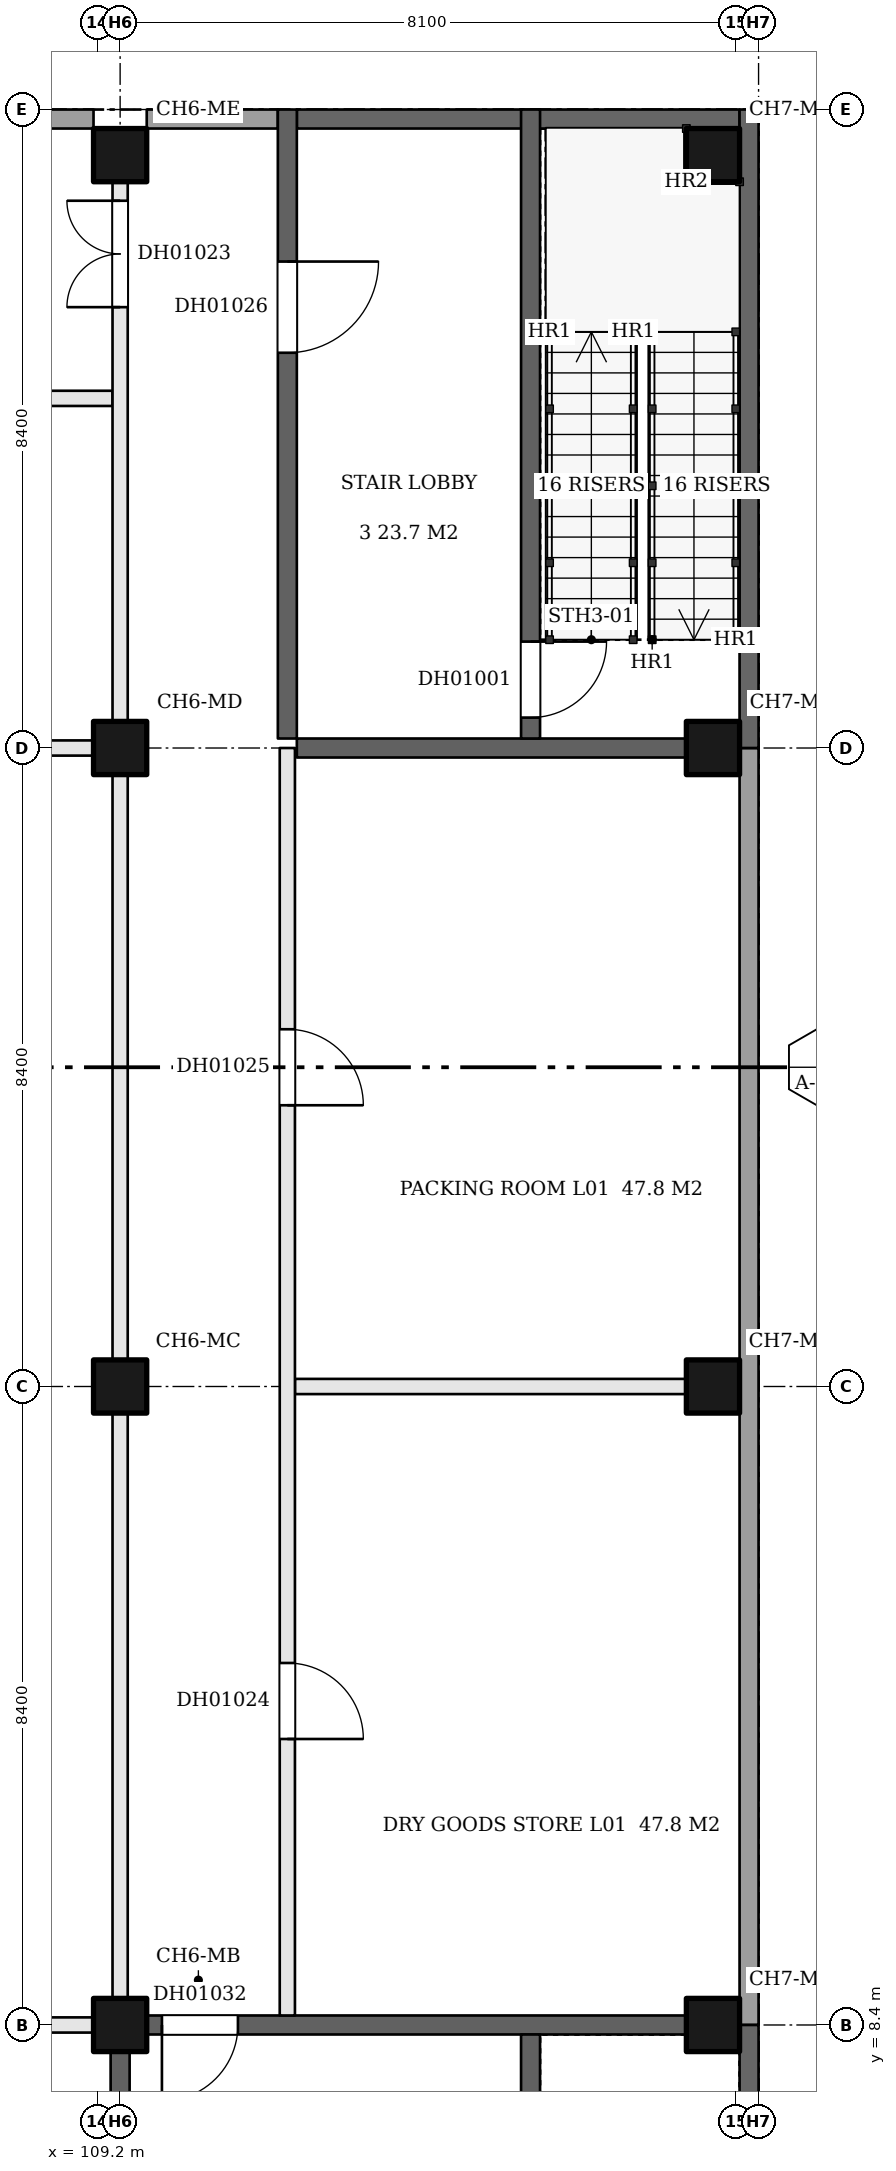
"""IFC4 building model, lengths in metres.
Left out: names, types, materials, properties, quantities, classifications, styles, units other than length and angle.
Written with IfcOpenShell. Run it as: python <this file> out.ifc"""

import sys

from ifc_helpers import new_model, si_unit, direction, frame, frame_2d, origin, origin_2d, place, context, subcontext, project, spatial, rectangle, extrude, element, fill, save


model = new_model("IFC4")
c1 = context("Model", 3, precision=1e-05, world=origin(), true_north=direction((0.0, 1.0)))
c2 = subcontext(c1, "Body", "Model", "MODEL_VIEW")
j1 = project(units=[si_unit("LENGTHUNIT", "METRE"), si_unit("PLANEANGLEUNIT", "RADIAN")], contexts=[c1])
p1 = place(None, origin())
s1 = spatial("IfcSite", under=j1, at=p1, CompositionType="ELEMENT")
p2 = place(p1, origin())
s2 = spatial("IfcBuilding", under=s1, at=p2, CompositionType="ELEMENT")
p3 = place(p2, frame((0.0, 0.0, 9.0)))
s3 = spatial("IfcBuildingStorey", under=s2, at=p3, CompositionType="ELEMENT", Elevation=9.0)
for number, where, z_axis, x_axis in (
    (1, (109.5, 8.4, 0.0), (0.0, 0.0, 1.0), (1.0, 0.0, 0.0)),
    (2, (109.5, 16.8, 0.0), (0.0, 0.0, 1.0), (1.0, 0.0, 0.0)),
    (3, (109.5, 25.2, 0.0), (0.0, 0.0, 1.0), (1.0, 0.0, 0.0)),
    (4, (109.5, 33.0, 0.0), (0.0, 0.0, 1.0), (1.0, 0.0, 0.0)),
    (5, (117.3, 8.4, 0.0), (0.0, 0.0, 1.0), (1.0, 0.0, 0.0)),
    (6, (117.3, 16.8, 0.0), (0.0, 0.0, 1.0), (1.0, 0.0, 0.0)),
    (7, (117.3, 25.2, 0.0), (0.0, 0.0, 1.0), (1.0, 0.0, 0.0)),
    (8, (117.3, 33.0, 0.0), (0.0, 0.0, 1.0), (1.0, 0.0, 0.0)),
):
    element("IfcColumn", number, at=place(p3, frame(where, z_axis=z_axis, x_axis=x_axis)), inside=s3, PredefinedType="COLUMN", context=c2, shape_type="SweptSolid", body=[
        extrude(rectangle(XDim=0.7, YDim=0.7, at=origin_2d()), origin(), (0.0, 0.0, 1.0), 5.1),
    ])
p4 = place(p3, frame((101.45, 8.4, 0.0), z_axis=(0.0, 0.0, 1.0), x_axis=(1.0, 0.0, 0.0)))
e9 = element("IfcWall", 9, at=p4, inside=s3, PredefinedType="PARTITIONING", context=c2, shape_type="SweptSolid", body=[
    extrude(rectangle(XDim=7.7, YDim=0.2, at=frame_2d((3.85, 0.0))), origin(), (0.0, 0.0, 1.0), 5.1),
])
p5 = place(p4, frame((2.15, 0.0, 0.0)))
e10 = element("IfcOpeningElement", 10, at=p5, cuts=e9, PredefinedType="OPENING", context=c2, shape_type="SweptSolid", body=[
    extrude(rectangle(XDim=1.0, YDim=2.1, at=frame_2d((0.5, 1.05))), frame((0.0, 0.11, 0.0), z_axis=(0.0, -1.0, 0.0), x_axis=(1.0, 0.0, 0.0)), (0.0, 0.0, 1.0), 0.22),
])
p6 = place(p4, frame((5.15, 0.0, 0.0)))
e11 = element("IfcOpeningElement", 11, at=p6, cuts=e9, PredefinedType="OPENING", context=c2, shape_type="SweptSolid", body=[
    extrude(rectangle(XDim=1.0, YDim=2.1, at=frame_2d((0.5, 1.05))), frame((0.0, 0.11, 0.0), z_axis=(0.0, -1.0, 0.0), x_axis=(1.0, 0.0, 0.0)), (0.0, 0.0, 1.0), 0.22),
])
p7 = place(p3, frame((109.85, 8.4, 0.0), z_axis=(0.0, 0.0, 1.0), x_axis=(1.0, 0.0, 0.0)))
e12 = element("IfcWall", 12, at=p7, inside=s3, PredefinedType="SHEAR", context=c2, shape_type="SweptSolid", body=[
    extrude(rectangle(XDim=7.1, YDim=0.25, at=frame_2d((3.55, 0.0))), origin(), (0.0, 0.0, 1.0), 5.1),
])
p8 = place(p7, frame((0.2, 0.0, 0.0)))
e13 = element("IfcOpeningElement", 13, at=p8, cuts=e12, PredefinedType="OPENING", context=c2, shape_type="SweptSolid", body=[
    extrude(rectangle(XDim=1.0, YDim=2.1, at=frame_2d((0.5, 1.05))), frame((0.0, 0.135, 0.0), z_axis=(0.0, -1.0, 0.0), x_axis=(1.0, 0.0, 0.0)), (0.0, 0.0, 1.0), 0.27),
])
p9 = place(p3, frame((111.8, 16.8, 0.0), z_axis=(0.0, 0.0, 1.0), x_axis=(1.0, 0.0, 0.0)))
e14 = element("IfcWall", 14, at=p9, inside=s3, PredefinedType="PARTITIONING", context=c2, shape_type="SweptSolid", body=[
    extrude(rectangle(XDim=5.15, YDim=0.2, at=frame_2d((2.575, 0.0))), origin(), (0.0, 0.0, 1.0), 5.1),
])
p10 = place(p3, frame((101.45, 25.2, 0.0), z_axis=(0.0, 0.0, 1.0), x_axis=(1.0, 0.0, 0.0)))
e15 = element("IfcWall", 15, at=p10, inside=s3, PredefinedType="PARTITIONING", context=c2, shape_type="SweptSolid", body=[
    extrude(rectangle(XDim=7.7, YDim=0.2, at=frame_2d((3.85, 0.0))), origin(), (0.0, 0.0, 1.0), 5.1),
])
p11 = place(p3, frame((111.825, 25.2, 0.0), z_axis=(0.0, 0.0, 1.0), x_axis=(1.0, 0.0, 0.0)))
e16 = element("IfcWall", 16, at=p11, inside=s3, PredefinedType="SHEAR", context=c2, shape_type="SweptSolid", body=[
    extrude(rectangle(XDim=5.125, YDim=0.25, at=frame_2d((2.562, 0.0))), origin(), (0.0, 0.0, 1.0), 5.1),
])
p12 = place(p3, frame((76.025, 29.8, 0.0), z_axis=(0.0, 0.0, 1.0), x_axis=(1.0, 0.0, 0.0)))
e17 = element("IfcWall", 17, at=p12, inside=s3, PredefinedType="PARTITIONING", context=c2, shape_type="SweptSolid", body=[
    extrude(rectangle(XDim=33.375, YDim=0.2, at=frame_2d((16.688, 0.0))), origin(), (0.0, 0.0, 1.0), 5.1),
])
p13 = place(p12, frame((1.538, 0.0, 0.0)))
e18 = element("IfcOpeningElement", 18, at=p13, cuts=e17, PredefinedType="OPENING", context=c2, shape_type="SweptSolid", body=[
    extrude(rectangle(XDim=1.0, YDim=2.1, at=frame_2d((0.5, 1.05))), frame((0.0, 0.11, 0.0), z_axis=(0.0, -1.0, 0.0), x_axis=(1.0, 0.0, 0.0)), (0.0, 0.0, 1.0), 0.22),
])
p14 = place(p12, frame((5.675, 0.0, 0.0)))
e19 = element("IfcOpeningElement", 19, at=p14, cuts=e17, PredefinedType="OPENING", context=c2, shape_type="SweptSolid", body=[
    extrude(rectangle(XDim=1.0, YDim=2.1, at=frame_2d((0.5, 1.05))), frame((0.0, 0.11, 0.0), z_axis=(0.0, -1.0, 0.0), x_axis=(1.0, 0.0, 0.0)), (0.0, 0.0, 1.0), 0.22),
])
p15 = place(p12, frame((9.175, 0.0, 0.0)))
e20 = element("IfcOpeningElement", 20, at=p15, cuts=e17, PredefinedType="OPENING", context=c2, shape_type="SweptSolid", body=[
    extrude(rectangle(XDim=1.0, YDim=2.1, at=frame_2d((0.5, 1.05))), frame((0.0, 0.11, 0.0), z_axis=(0.0, -1.0, 0.0), x_axis=(1.0, 0.0, 0.0)), (0.0, 0.0, 1.0), 0.22),
])
p16 = place(p12, frame((14.775, 0.0, 0.0)))
e21 = element("IfcOpeningElement", 21, at=p16, cuts=e17, PredefinedType="OPENING", context=c2, shape_type="SweptSolid", body=[
    extrude(rectangle(XDim=1.0, YDim=2.1, at=frame_2d((0.5, 1.05))), frame((0.0, 0.11, 0.0), z_axis=(0.0, -1.0, 0.0), x_axis=(1.0, 0.0, 0.0)), (0.0, 0.0, 1.0), 0.22),
])
p17 = place(p12, frame((22.475, 0.0, 0.0)))
e22 = element("IfcOpeningElement", 22, at=p17, cuts=e17, PredefinedType="OPENING", context=c2, shape_type="SweptSolid", body=[
    extrude(rectangle(XDim=1.0, YDim=2.1, at=frame_2d((0.5, 1.05))), frame((0.0, 0.11, 0.0), z_axis=(0.0, -1.0, 0.0), x_axis=(1.0, 0.0, 0.0)), (0.0, 0.0, 1.0), 0.22),
])
p18 = place(p12, frame((29.475, 0.0, 0.0)))
e23 = element("IfcOpeningElement", 23, at=p18, cuts=e17, PredefinedType="OPENING", context=c2, shape_type="SweptSolid", body=[
    extrude(rectangle(XDim=1.0, YDim=2.1, at=frame_2d((0.5, 1.05))), frame((0.0, 0.11, 0.0), z_axis=(0.0, -1.0, 0.0), x_axis=(1.0, 0.0, 0.0)), (0.0, 0.0, 1.0), 0.22),
])
p19 = place(p3, frame((101.45, 33.475, 0.0), z_axis=(0.0, 0.0, 1.0), x_axis=(1.0, 0.0, 0.0)))
e24 = element("IfcWall", 24, at=p19, inside=s3, PredefinedType="SOLIDWALL", context=c2, shape_type="SweptSolid", body=[
    extrude(rectangle(XDim=7.7, YDim=0.25, at=frame_2d((3.85, 0.0))), origin(), (0.0, 0.0, 1.0), 5.1),
])
p20 = place(p19, frame((0.725, 0.0, 0.9)))
e25 = element("IfcOpeningElement", 25, at=p20, cuts=e24, PredefinedType="OPENING", context=c2, shape_type="SweptSolid", body=[
    extrude(rectangle(XDim=2.4, YDim=1.5, at=frame_2d((1.2, 0.75))), frame((0.0, 0.135, 0.0), z_axis=(0.0, -1.0, 0.0), x_axis=(1.0, 0.0, 0.0)), (0.0, 0.0, 1.0), 0.27),
])
p21 = place(p19, frame((4.575, 0.0, 0.9)))
e26 = element("IfcOpeningElement", 26, at=p21, cuts=e24, PredefinedType="OPENING", context=c2, shape_type="SweptSolid", body=[
    extrude(rectangle(XDim=2.4, YDim=1.5, at=frame_2d((1.2, 0.75))), frame((0.0, 0.135, 0.0), z_axis=(0.0, -1.0, 0.0), x_axis=(1.0, 0.0, 0.0)), (0.0, 0.0, 1.0), 0.27),
])
p22 = place(p3, frame((109.85, 33.475, 0.0), z_axis=(0.0, 0.0, 1.0), x_axis=(1.0, 0.0, 0.0)))
e27 = element("IfcWall", 27, at=p22, inside=s3, PredefinedType="SOLIDWALL", context=c2, shape_type="SweptSolid", body=[
    extrude(rectangle(XDim=1.725, YDim=0.25, at=frame_2d((0.862, 0.0))), origin(), (0.0, 0.0, 1.0), 5.1),
])
p23 = place(p3, frame((111.825, 33.475, 0.0), z_axis=(0.0, 0.0, 1.0), x_axis=(1.0, 0.0, 0.0)))
e28 = element("IfcWall", 28, at=p23, inside=s3, PredefinedType="SHEAR", context=c2, shape_type="SweptSolid", body=[
    extrude(rectangle(XDim=5.825, YDim=0.25, at=frame_2d((2.913, 0.0))), origin(), (0.0, 0.0, 1.0), 5.1),
])
p24 = place(p3, frame((109.5, 0.95, 0.0), z_axis=(0.0, 0.0, 1.0), x_axis=(0.0, 1.0, 0.0)))
e29 = element("IfcWall", 29, at=p24, inside=s3, PredefinedType="SHEAR", context=c2, shape_type="SweptSolid", body=[
    extrude(rectangle(XDim=7.1, YDim=0.25, at=frame_2d((3.55, 0.0))), origin(), (0.0, 0.0, 1.0), 5.1),
])
p25 = place(p24, frame((4.25, 0.0, 0.0)))
e30 = element("IfcOpeningElement", 30, at=p25, cuts=e29, PredefinedType="OPENING", context=c2, shape_type="SweptSolid", body=[
    extrude(rectangle(XDim=1.4, YDim=2.1, at=frame_2d((0.7, 1.05))), frame((0.0, 0.135, 0.0), z_axis=(0.0, -1.0, 0.0), x_axis=(1.0, 0.0, 0.0)), (0.0, 0.0, 1.0), 0.27),
])
p26 = place(p3, frame((109.5, 8.75, 0.0), z_axis=(0.0, 0.0, 1.0), x_axis=(0.0, 1.0, 0.0)))
e31 = element("IfcWall", 31, at=p26, inside=s3, PredefinedType="PARTITIONING", context=c2, shape_type="SweptSolid", body=[
    extrude(rectangle(XDim=7.7, YDim=0.2, at=frame_2d((3.85, 0.0))), origin(), (0.0, 0.0, 1.0), 5.1),
])
p27 = place(p3, frame((109.5, 17.15, 0.0), z_axis=(0.0, 0.0, 1.0), x_axis=(0.0, 1.0, 0.0)))
e32 = element("IfcWall", 32, at=p27, inside=s3, PredefinedType="PARTITIONING", context=c2, shape_type="SweptSolid", body=[
    extrude(rectangle(XDim=7.7, YDim=0.2, at=frame_2d((3.85, 0.0))), origin(), (0.0, 0.0, 1.0), 5.1),
])
p28 = place(p3, frame((109.5, 25.55, 0.0), z_axis=(0.0, 0.0, 1.0), x_axis=(0.0, 1.0, 0.0)))
e33 = element("IfcWall", 33, at=p28, inside=s3, PredefinedType="PARTITIONING", context=c2, shape_type="SweptSolid", body=[
    extrude(rectangle(XDim=7.1, YDim=0.2, at=frame_2d((3.55, 0.0))), origin(), (0.0, 0.0, 1.0), 5.1),
])
p29 = place(p28, frame((5.45, 0.0, 0.0)))
e34 = element("IfcOpeningElement", 34, at=p29, cuts=e33, PredefinedType="OPENING", context=c2, shape_type="SweptSolid", body=[
    extrude(rectangle(XDim=1.4, YDim=2.1, at=frame_2d((0.7, 1.05))), frame((0.0, 0.11, 0.0), z_axis=(0.0, -1.0, 0.0), x_axis=(1.0, 0.0, 0.0)), (0.0, 0.0, 1.0), 0.22),
])
p30 = place(p3, frame((111.7, 8.525, 0.0), z_axis=(0.0, 0.0, 1.0), x_axis=(0.0, 1.0, 0.0)))
e35 = element("IfcWall", 35, at=p30, inside=s3, PredefinedType="PARTITIONING", context=c2, shape_type="SweptSolid", body=[
    extrude(rectangle(XDim=16.675, YDim=0.2, at=frame_2d((8.337, 0.0))), origin(), (0.0, 0.0, 1.0), 5.1),
])
p31 = place(p30, frame((3.637, 0.0, 0.0)))
e36 = element("IfcOpeningElement", 36, at=p31, cuts=e35, PredefinedType="OPENING", context=c2, shape_type="SweptSolid", body=[
    extrude(rectangle(XDim=1.0, YDim=2.1, at=frame_2d((0.5, 1.05))), frame((0.0, 0.11, 0.0), z_axis=(0.0, -1.0, 0.0), x_axis=(1.0, 0.0, 0.0)), (0.0, 0.0, 1.0), 0.22),
])
p32 = place(p30, frame((11.975, 0.0, 0.0)))
e37 = element("IfcOpeningElement", 37, at=p32, cuts=e35, PredefinedType="OPENING", context=c2, shape_type="SweptSolid", body=[
    extrude(rectangle(XDim=1.0, YDim=2.1, at=frame_2d((0.5, 1.05))), frame((0.0, 0.11, 0.0), z_axis=(0.0, -1.0, 0.0), x_axis=(1.0, 0.0, 0.0)), (0.0, 0.0, 1.0), 0.22),
])
p33 = place(p3, frame((111.7, 25.325, 0.0), z_axis=(0.0, 0.0, 1.0), x_axis=(0.0, 1.0, 0.0)))
e38 = element("IfcWall", 38, at=p33, inside=s3, PredefinedType="SHEAR", context=c2, shape_type="SweptSolid", body=[
    extrude(rectangle(XDim=8.275, YDim=0.25, at=frame_2d((4.138, 0.0))), origin(), (0.0, 0.0, 1.0), 5.1),
])
p34 = place(p33, frame((5.075, 0.0, 0.0)))
e39 = element("IfcOpeningElement", 39, at=p34, cuts=e38, PredefinedType="OPENING", context=c2, shape_type="SweptSolid", body=[
    extrude(rectangle(XDim=1.2, YDim=2.1, at=frame_2d((0.6, 1.05))), frame((0.0, 0.135, 0.0), z_axis=(0.0, -1.0, 0.0), x_axis=(1.0, 0.0, 0.0)), (0.0, 0.0, 1.0), 0.27),
])
p35 = place(p3, frame((114.9, 3.125, 0.0), z_axis=(0.0, 0.0, 1.0), x_axis=(0.0, 1.0, 0.0)))
e40 = element("IfcWall", 40, at=p35, inside=s3, PredefinedType="SHEAR", context=c2, shape_type="SweptSolid", body=[
    extrude(rectangle(XDim=5.15, YDim=0.25, at=frame_2d((2.575, 0.0))), origin(), (0.0, 0.0, 1.0), 5.1),
])
p36 = place(p35, frame((3.075, 0.0, 0.0)))
e41 = element("IfcOpeningElement", 41, at=p36, cuts=e40, PredefinedType="OPENING", context=c2, shape_type="SweptSolid", body=[
    extrude(rectangle(XDim=1.1, YDim=2.1, at=frame_2d((0.55, 1.05))), frame((0.0, 0.135, 0.0), z_axis=(0.0, -1.0, 0.0), x_axis=(1.0, 0.0, 0.0)), (0.0, 0.0, 1.0), 0.27),
])
p37 = place(p35, frame((0.475, 0.0, 0.0)))
e42 = element("IfcOpeningElement", 42, at=p37, cuts=e40, PredefinedType="OPENING", context=c2, shape_type="SweptSolid", body=[
    extrude(rectangle(XDim=0.9, YDim=2.1, at=frame_2d((0.45, 1.05))), frame((0.0, 0.135, 0.0), z_axis=(0.0, -1.0, 0.0), x_axis=(1.0, 0.0, 0.0)), (0.0, 0.0, 1.0), 0.27),
])
p38 = place(p3, frame((114.9, 25.325, 0.0), z_axis=(0.0, 0.0, 1.0), x_axis=(0.0, 1.0, 0.0)))
e43 = element("IfcWall", 43, at=p38, inside=s3, PredefinedType="SHEAR", context=c2, shape_type="SweptSolid", body=[
    extrude(rectangle(XDim=8.275, YDim=0.25, at=frame_2d((4.138, 0.0))), origin(), (0.0, 0.0, 1.0), 5.1),
])
p39 = place(p38, frame((0.275, 0.0, 0.0)))
e44 = element("IfcOpeningElement", 44, at=p39, cuts=e43, PredefinedType="OPENING", context=c2, shape_type="SweptSolid", body=[
    extrude(rectangle(XDim=1.0, YDim=2.1, at=frame_2d((0.5, 1.05))), frame((0.0, 0.135, 0.0), z_axis=(0.0, -1.0, 0.0), x_axis=(1.0, 0.0, 0.0)), (0.0, 0.0, 1.0), 0.27),
])
p40 = place(p3, frame((117.775, 0.0, 0.0), z_axis=(0.0, 0.0, 1.0), x_axis=(0.0, 1.0, 0.0)))
e45 = element("IfcWall", 45, at=p40, inside=s3, PredefinedType="SHEAR", context=c2, shape_type="SweptSolid", body=[
    extrude(rectangle(XDim=8.4, YDim=0.25, at=frame_2d((4.2, 0.0))), origin(), (0.0, 0.0, 1.0), 5.1),
])
p41 = place(p3, frame((117.775, 8.4, 0.0), z_axis=(0.0, 0.0, 1.0), x_axis=(0.0, 1.0, 0.0)))
e46 = element("IfcWall", 46, at=p41, inside=s3, PredefinedType="SOLIDWALL", context=c2, shape_type="SweptSolid", body=[
    extrude(rectangle(XDim=16.8, YDim=0.25, at=frame_2d((8.4, 0.0))), origin(), (0.0, 0.0, 1.0), 5.1),
])
p42 = place(p3, frame((117.775, 25.2, 0.0), z_axis=(0.0, 0.0, 1.0), x_axis=(0.0, 1.0, 0.0)))
e47 = element("IfcWall", 47, at=p42, inside=s3, PredefinedType="SHEAR", context=c2, shape_type="SweptSolid", body=[
    extrude(rectangle(XDim=8.4, YDim=0.25, at=frame_2d((4.2, 0.0))), origin(), (0.0, 0.0, 1.0), 5.1),
])
p43 = place(p39, frame((1.0, 0.0, 0.0), z_axis=(0.0, 0.0, 1.0), x_axis=(-1.0, 0.0, 0.0)))
e48 = element("IfcDoor", 48, at=p43, inside=s3, OperationType="SINGLE_SWING_LEFT", PredefinedType="DOOR", context=c2, shape_type="SweptSolid", body=[
    extrude(rectangle(XDim=1.0, YDim=2.1, at=frame_2d((0.5, 1.05))), frame((0.0, 0.025, 0.0), z_axis=(0.0, -1.0, 0.0), x_axis=(1.0, 0.0, 0.0)), (0.0, 0.0, 1.0), 0.05),
])
fill(e44, e48)
p44 = place(p29, origin())
e49 = element("IfcDoor", 49, at=p44, inside=s3, OperationType="DOUBLE_DOOR_SINGLE_SWING", PredefinedType="DOOR", context=c2, shape_type="SweptSolid", body=[
    extrude(rectangle(XDim=1.4, YDim=2.1, at=frame_2d((0.7, 1.05))), frame((0.0, 0.025, 0.0), z_axis=(0.0, -1.0, 0.0), x_axis=(1.0, 0.0, 0.0)), (0.0, 0.0, 1.0), 0.05),
])
fill(e34, e49)
p45 = place(p31, frame((1.0, 0.0, 0.0), z_axis=(0.0, 0.0, 1.0), x_axis=(-1.0, 0.0, 0.0)))
e50 = element("IfcDoor", 50, at=p45, inside=s3, OperationType="SINGLE_SWING_RIGHT", PredefinedType="DOOR", context=c2, shape_type="SweptSolid", body=[
    extrude(rectangle(XDim=1.0, YDim=2.1, at=frame_2d((0.5, 1.05))), frame((0.0, 0.025, 0.0), z_axis=(0.0, -1.0, 0.0), x_axis=(1.0, 0.0, 0.0)), (0.0, 0.0, 1.0), 0.05),
])
fill(e36, e50)
p46 = place(p32, frame((1.0, 0.0, 0.0), z_axis=(0.0, 0.0, 1.0), x_axis=(-1.0, 0.0, 0.0)))
e51 = element("IfcDoor", 51, at=p46, inside=s3, OperationType="SINGLE_SWING_RIGHT", PredefinedType="DOOR", context=c2, shape_type="SweptSolid", body=[
    extrude(rectangle(XDim=1.0, YDim=2.1, at=frame_2d((0.5, 1.05))), frame((0.0, 0.025, 0.0), z_axis=(0.0, -1.0, 0.0), x_axis=(1.0, 0.0, 0.0)), (0.0, 0.0, 1.0), 0.05),
])
fill(e37, e51)
p47 = place(p34, frame((1.2, 0.0, 0.0), z_axis=(0.0, 0.0, 1.0), x_axis=(-1.0, 0.0, 0.0)))
e52 = element("IfcDoor", 52, at=p47, inside=s3, OperationType="SINGLE_SWING_LEFT", PredefinedType="DOOR", context=c2, shape_type="SweptSolid", body=[
    extrude(rectangle(XDim=1.2, YDim=2.1, at=frame_2d((0.6, 1.05))), frame((0.0, 0.025, 0.0), z_axis=(0.0, -1.0, 0.0), x_axis=(1.0, 0.0, 0.0)), (0.0, 0.0, 1.0), 0.05),
])
fill(e39, e52)
p48 = place(p8, frame((1.0, 0.0, 0.0), z_axis=(0.0, 0.0, 1.0), x_axis=(-1.0, 0.0, 0.0)))
e53 = element("IfcDoor", 53, at=p48, inside=s3, OperationType="SINGLE_SWING_RIGHT", PredefinedType="DOOR", context=c2, shape_type="SweptSolid", body=[
    extrude(rectangle(XDim=1.0, YDim=2.1, at=frame_2d((0.5, 1.05))), frame((0.0, 0.025, 0.0), z_axis=(0.0, -1.0, 0.0), x_axis=(1.0, 0.0, 0.0)), (0.0, 0.0, 1.0), 0.05),
])
fill(e13, e53)
save(model, sys.argv[1])
